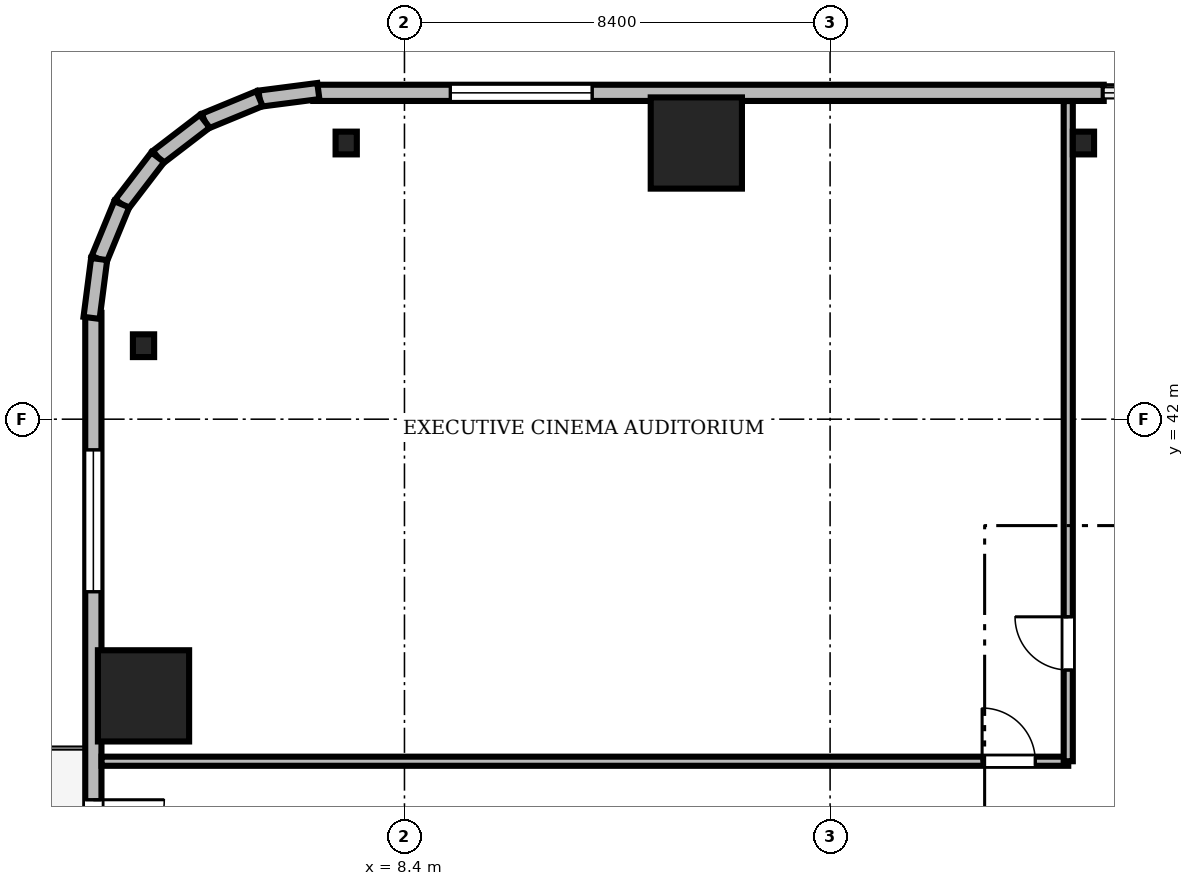
"""IFC4 building model, lengths in metres.
Left out: names, types, materials, properties, quantities, classifications, styles, units other than length and angle.
Written with IfcOpenShell. Run it as: python <this file> out.ifc"""

import sys

from ifc_helpers import new_model, si_unit, direction, frame, frame_2d, origin, origin_2d, place, context, subcontext, project, spatial, rectangle, i_section, extrude, source, transform, mapped, element, fill, save


model = new_model("IFC4")
c1 = context("Model", 3, precision=1e-05, world=origin(), true_north=direction((0.0, 1.0)))
c2 = subcontext(c1, "Body", "Model", "MODEL_VIEW")
j1 = project(units=[si_unit("LENGTHUNIT", "METRE"), si_unit("PLANEANGLEUNIT", "RADIAN")], contexts=[c1])
p1 = place(None, origin())
s1 = spatial("IfcSite", under=j1, at=p1, CompositionType="ELEMENT")
p2 = place(p1, origin())
s2 = spatial("IfcBuilding", under=s1, at=p2, CompositionType="ELEMENT")
p3 = place(p2, frame((0.0, 0.0, 64.1)))
s3 = spatial("IfcBuildingStorey", under=s2, at=p3, CompositionType="ELEMENT", Elevation=64.1)
m1 = source(origin(), c2, "Body", "SweptSolid", [
    extrude(rectangle(XDim=1.8, YDim=1.8, at=origin_2d()), origin(), (0.0, 0.0, 1.0), 3.41),
])
for number, where, z_axis, x_axis in (
    (1, (14.16, 47.45, 0.0), (0.0, 0.0, 1.0), (1.0, 0.0, 0.0)),
    (2, (3.25, 36.54, 0.0), (0.0, 0.0, 1.0), (1.0, 0.0, 0.0)),
):
    element("IfcColumn", number, at=place(p3, frame(where, z_axis=z_axis, x_axis=x_axis)), inside=s3, PredefinedType="COLUMN", context=c2, shape_type="MappedRepresentation", body=[
        mapped(m1, transform((0.0, 0.0, 0.0), scale=1.0)),
    ])
m2 = source(origin(), c2, "Body", "SweptSolid", [
    extrude(i_section(OverallWidth=0.419, OverallDepth=0.449, WebThickness=0.031, FlangeThickness=0.048, FilletRadius=0.015, at=origin_2d()), origin(), (0.0, 0.0, 1.0), 3.41),
])
for number, where, z_axis, x_axis in (
    (3, (21.8, 47.45, 0.0), (0.0, 0.0, 1.0), (1.0, 0.0, 0.0)),
    (4, (7.25, 47.45, 0.0), (0.0, 0.0, 1.0), (1.0, 0.0, 0.0)),
    (5, (3.25, 43.45, 0.0), (0.0, 0.0, 1.0), (1.0, 0.0, 0.0)),
):
    element("IfcColumn", number, at=place(p3, frame(where, z_axis=z_axis, x_axis=x_axis)), inside=s3, PredefinedType="COLUMN", context=c2, shape_type="MappedRepresentation", body=[
        mapped(m2, transform((0.0, 0.0, 0.0), scale=1.0)),
    ])
m3 = source(origin(), c2, "Body", "SweptSolid", [
    extrude(rectangle(XDim=15.6, YDim=0.32, at=frame_2d((7.8, 0.0))), origin(), (0.0, 0.0, 1.0), 3.41),
])
p4 = place(p3, frame((22.2, 48.44, 0.0), z_axis=(0.0, 0.0, 1.0), x_axis=(-1.0, 0.0, 0.0)))
e6 = element("IfcWall", 6, at=p4, inside=s3, PredefinedType="SOLIDWALL", context=c2, shape_type="MappedRepresentation", body=[
    mapped(m3, transform((0.0, 0.0, 0.0), scale=1.0)),
])
m4 = source(origin(), c2, "Body", "SweptSolid", [
    extrude(rectangle(XDim=2.8, YDim=2.4, at=frame_2d((1.4, 1.2))), frame((0.0, 0.17, 0.0), z_axis=(0.0, -1.0, 0.0), x_axis=(1.0, 0.0, 0.0)), (0.0, 0.0, 1.0), 0.34),
])
p5 = place(p4, frame((10.095, 0.0, 0.72)))
e7 = element("IfcOpeningElement", 7, at=p5, cuts=e6, PredefinedType="OPENING", context=c2, shape_type="MappedRepresentation", body=[
    mapped(m4, transform((0.0, 0.0, 0.0), scale=1.0)),
])
m5 = source(origin(), c2, "Body", "SweptSolid", [
    extrude(rectangle(XDim=15.6, YDim=0.32, at=frame_2d((7.8, 0.0))), origin(), (0.0, 0.0, 1.0), 3.41),
])
p6 = place(p3, frame((2.26, 44.1, 0.0), z_axis=(0.0, 0.0, 1.0), x_axis=(0.0, -1.0, 0.0)))
e8 = element("IfcWall", 8, at=p6, inside=s3, PredefinedType="SOLIDWALL", context=c2, shape_type="MappedRepresentation", body=[
    mapped(m5, transform((0.0, 0.0, 0.0), scale=1.0)),
])
m6 = source(origin(), c2, "Body", "SweptSolid", [
    extrude(rectangle(XDim=1.4, YDim=2.3, at=frame_2d((0.7, 1.15))), frame((0.0, 0.17, 0.0), z_axis=(0.0, -1.0, 0.0), x_axis=(1.0, 0.0, 0.0)), (0.0, 0.0, 1.0), 0.34),
])
p7 = place(p6, frame((9.61, 0.0, 0.0)))
e9 = element("IfcOpeningElement", 9, at=p7, cuts=e8, PredefinedType="OPENING", context=c2, shape_type="MappedRepresentation", body=[
    mapped(m6, transform((0.0, 0.0, 0.0), scale=1.0)),
])
p8 = place(p6, frame((2.705, 0.0, 0.72)))
e10 = element("IfcOpeningElement", 10, at=p8, cuts=e8, PredefinedType="OPENING", context=c2, shape_type="MappedRepresentation", body=[
    mapped(m4, transform((0.0, 0.0, 0.0), scale=1.0)),
])
m7 = source(origin(), c2, "Body", "SweptSolid", [
    extrude(rectangle(XDim=1.17, YDim=0.32, at=frame_2d((0.585, 0.0))), origin(), (0.0, 0.0, 1.0), 3.41),
])
p9 = place(p3, frame((6.7, 48.476, 0.0), z_axis=(0.0, 0.0, 1.0), x_axis=(-0.991735963317, -0.128295670475, 0.0)))
e11 = element("IfcWall", 11, at=p9, inside=s3, PredefinedType="SOLIDWALL", context=c2, shape_type="MappedRepresentation", body=[
    mapped(m7, transform((0.0, 0.0, 0.0), scale=1.0)),
])
m8 = source(origin(), c2, "Body", "SweptSolid", [
    extrude(rectangle(XDim=1.169, YDim=0.32, at=frame_2d((0.584, 0.0))), origin(), (0.0, 0.0, 1.0), 3.41),
])
p10 = place(p3, frame((5.54, 48.325, 0.0), z_axis=(0.0, 0.0, 1.0), x_axis=(-0.924552646638, -0.381054331552, 0.0)))
e12 = element("IfcWall", 12, at=p10, inside=s3, PredefinedType="SOLIDWALL", context=c2, shape_type="MappedRepresentation", body=[
    mapped(m8, transform((0.0, 0.0, 0.0), scale=1.0)),
])
m9 = source(origin(), c2, "Body", "SweptSolid", [
    extrude(rectangle(XDim=1.169, YDim=0.32, at=frame_2d((0.584, 0.0))), origin(), (0.0, 0.0, 1.0), 3.41),
])
p11 = place(p3, frame((4.459, 47.88, 0.0), z_axis=(0.0, 0.0, 1.0), x_axis=(-0.793663520347, -0.608356981114, 0.0)))
e13 = element("IfcWall", 13, at=p11, inside=s3, PredefinedType="SOLIDWALL", context=c2, shape_type="MappedRepresentation", body=[
    mapped(m9, transform((0.0, 0.0, 0.0), scale=1.0)),
])
m10 = source(origin(), c2, "Body", "SweptSolid", [
    extrude(rectangle(XDim=1.169, YDim=0.32, at=frame_2d((0.584, 0.0))), origin(), (0.0, 0.0, 1.0), 3.41),
])
p12 = place(p3, frame((3.531, 47.169, 0.0), z_axis=(0.0, 0.0, 1.0), x_axis=(-0.608387696831, -0.793639975269, 0.0)))
e14 = element("IfcWall", 14, at=p12, inside=s3, PredefinedType="SOLIDWALL", context=c2, shape_type="MappedRepresentation", body=[
    mapped(m10, transform((0.0, 0.0, 0.0), scale=1.0)),
])
p13 = place(p3, frame((2.82, 46.241, 0.0), z_axis=(0.0, 0.0, 1.0), x_axis=(-0.381054331552, -0.924552646638, 0.0)))
e15 = element("IfcWall", 15, at=p13, inside=s3, PredefinedType="SOLIDWALL", context=c2, shape_type="MappedRepresentation", body=[
    mapped(m8, transform((0.0, 0.0, 0.0), scale=1.0)),
])
p14 = place(p3, frame((2.375, 45.16, 0.0), z_axis=(0.0, 0.0, 1.0), x_axis=(-0.128295670475, -0.991735963317, 0.0)))
e16 = element("IfcWall", 16, at=p14, inside=s3, PredefinedType="SOLIDWALL", context=c2, shape_type="MappedRepresentation", body=[
    mapped(m7, transform((0.0, 0.0, 0.0), scale=1.0)),
])
m11 = source(origin(), c2, "Body", "SweptSolid", [
    extrude(rectangle(XDim=19.078, YDim=0.18, at=frame_2d((9.539, 0.0))), origin(), (0.0, 0.0, 1.0), 2.652),
])
p15 = place(p3, frame((2.422, 35.25, 0.0), z_axis=(0.0, 0.0, 1.0), x_axis=(1.0, 0.0, 0.0)))
e17 = element("IfcWall", 17, at=p15, inside=s3, PredefinedType="PARTITIONING", context=c2, shape_type="MappedRepresentation", body=[
    mapped(m11, transform((0.0, 0.0, 0.0), scale=1.0)),
])
m12 = source(origin(), c2, "Body", "SweptSolid", [
    extrude(rectangle(XDim=1.05, YDim=2.2, at=frame_2d((0.525, 1.1))), frame((0.0, 0.1, 0.0), z_axis=(0.0, -1.0, 0.0), x_axis=(1.0, 0.0, 0.0)), (0.0, 0.0, 1.0), 0.2),
])
p16 = place(p15, frame((17.378, 0.0, 0.0)))
e18 = element("IfcOpeningElement", 18, at=p16, cuts=e17, PredefinedType="OPENING", context=c2, shape_type="MappedRepresentation", body=[
    mapped(m12, transform((0.0, 0.0, 0.0), scale=1.0)),
])
m13 = source(origin(), c2, "Body", "SweptSolid", [
    extrude(rectangle(XDim=13.028, YDim=0.18, at=frame_2d((6.514, 0.0))), origin(), (0.0, 0.0, 1.0), 2.652),
])
p17 = place(p3, frame((21.5, 35.25, 0.0), z_axis=(0.0, 0.0, 1.0), x_axis=(0.0, 1.0, 0.0)))
e19 = element("IfcWall", 19, at=p17, inside=s3, PredefinedType="PARTITIONING", context=c2, shape_type="MappedRepresentation", body=[
    mapped(m13, transform((0.0, 0.0, 0.0), scale=1.0)),
])
p18 = place(p17, frame((1.8, 0.0, 0.0)))
e20 = element("IfcOpeningElement", 20, at=p18, cuts=e19, PredefinedType="OPENING", context=c2, shape_type="MappedRepresentation", body=[
    mapped(m12, transform((0.0, 0.0, 0.0), scale=1.0)),
])
m14 = source(origin(), c2, "Body", "SweptSolid", [
    extrude(rectangle(XDim=2.8, YDim=2.4, at=frame_2d((1.4, 1.2))), frame((0.0, 0.03, 0.0), z_axis=(0.0, -1.0, 0.0), x_axis=(1.0, 0.0, 0.0)), (0.0, 0.0, 1.0), 0.06),
])
p19 = place(p5, origin())
e21 = element("IfcWindow", 21, at=p19, inside=s3, PartitioningType="SINGLE_PANEL", PredefinedType="WINDOW", context=c2, shape_type="MappedRepresentation", body=[
    mapped(m14, transform((0.0, 0.0, 0.0), scale=1.0)),
])
fill(e7, e21)
m15 = source(origin(), c2, "Body", "SweptSolid", [
    extrude(rectangle(XDim=1.4, YDim=2.3, at=frame_2d((0.7, 1.15))), frame((0.0, 0.025, 0.0), z_axis=(0.0, -1.0, 0.0), x_axis=(1.0, 0.0, 0.0)), (0.0, 0.0, 1.0), 0.05),
])
p20 = place(p7, frame((1.4, 0.0, 0.0), z_axis=(0.0, 0.0, 1.0), x_axis=(-1.0, 0.0, 0.0)))
e22 = element("IfcDoor", 22, at=p20, inside=s3, OperationType="DOUBLE_DOOR_SLIDING", PredefinedType="DOOR", context=c2, shape_type="MappedRepresentation", body=[
    mapped(m15, transform((0.0, 0.0, 0.0), scale=1.0)),
])
fill(e9, e22)
p21 = place(p8, origin())
e23 = element("IfcWindow", 23, at=p21, inside=s3, PartitioningType="SINGLE_PANEL", PredefinedType="WINDOW", context=c2, shape_type="MappedRepresentation", body=[
    mapped(m14, transform((0.0, 0.0, 0.0), scale=1.0)),
])
fill(e10, e23)
m16 = source(origin(), c2, "Body", "SweptSolid", [
    extrude(rectangle(XDim=1.05, YDim=2.2, at=frame_2d((0.525, 1.1))), frame((0.0, 0.025, 0.0), z_axis=(0.0, -1.0, 0.0), x_axis=(1.0, 0.0, 0.0)), (0.0, 0.0, 1.0), 0.05),
])
p22 = place(p16, origin())
e24 = element("IfcDoor", 24, at=p22, inside=s3, OperationType="SINGLE_SWING_LEFT", PredefinedType="DOOR", context=c2, shape_type="MappedRepresentation", body=[
    mapped(m16, transform((0.0, 0.0, 0.0), scale=1.0)),
])
fill(e18, e24)
p23 = place(p18, origin())
e25 = element("IfcDoor", 25, at=p23, inside=s3, OperationType="SINGLE_SWING_RIGHT", PredefinedType="DOOR", context=c2, shape_type="MappedRepresentation", body=[
    mapped(m16, transform((0.0, 0.0, 0.0), scale=1.0)),
])
fill(e20, e25)
save(model, sys.argv[1])
